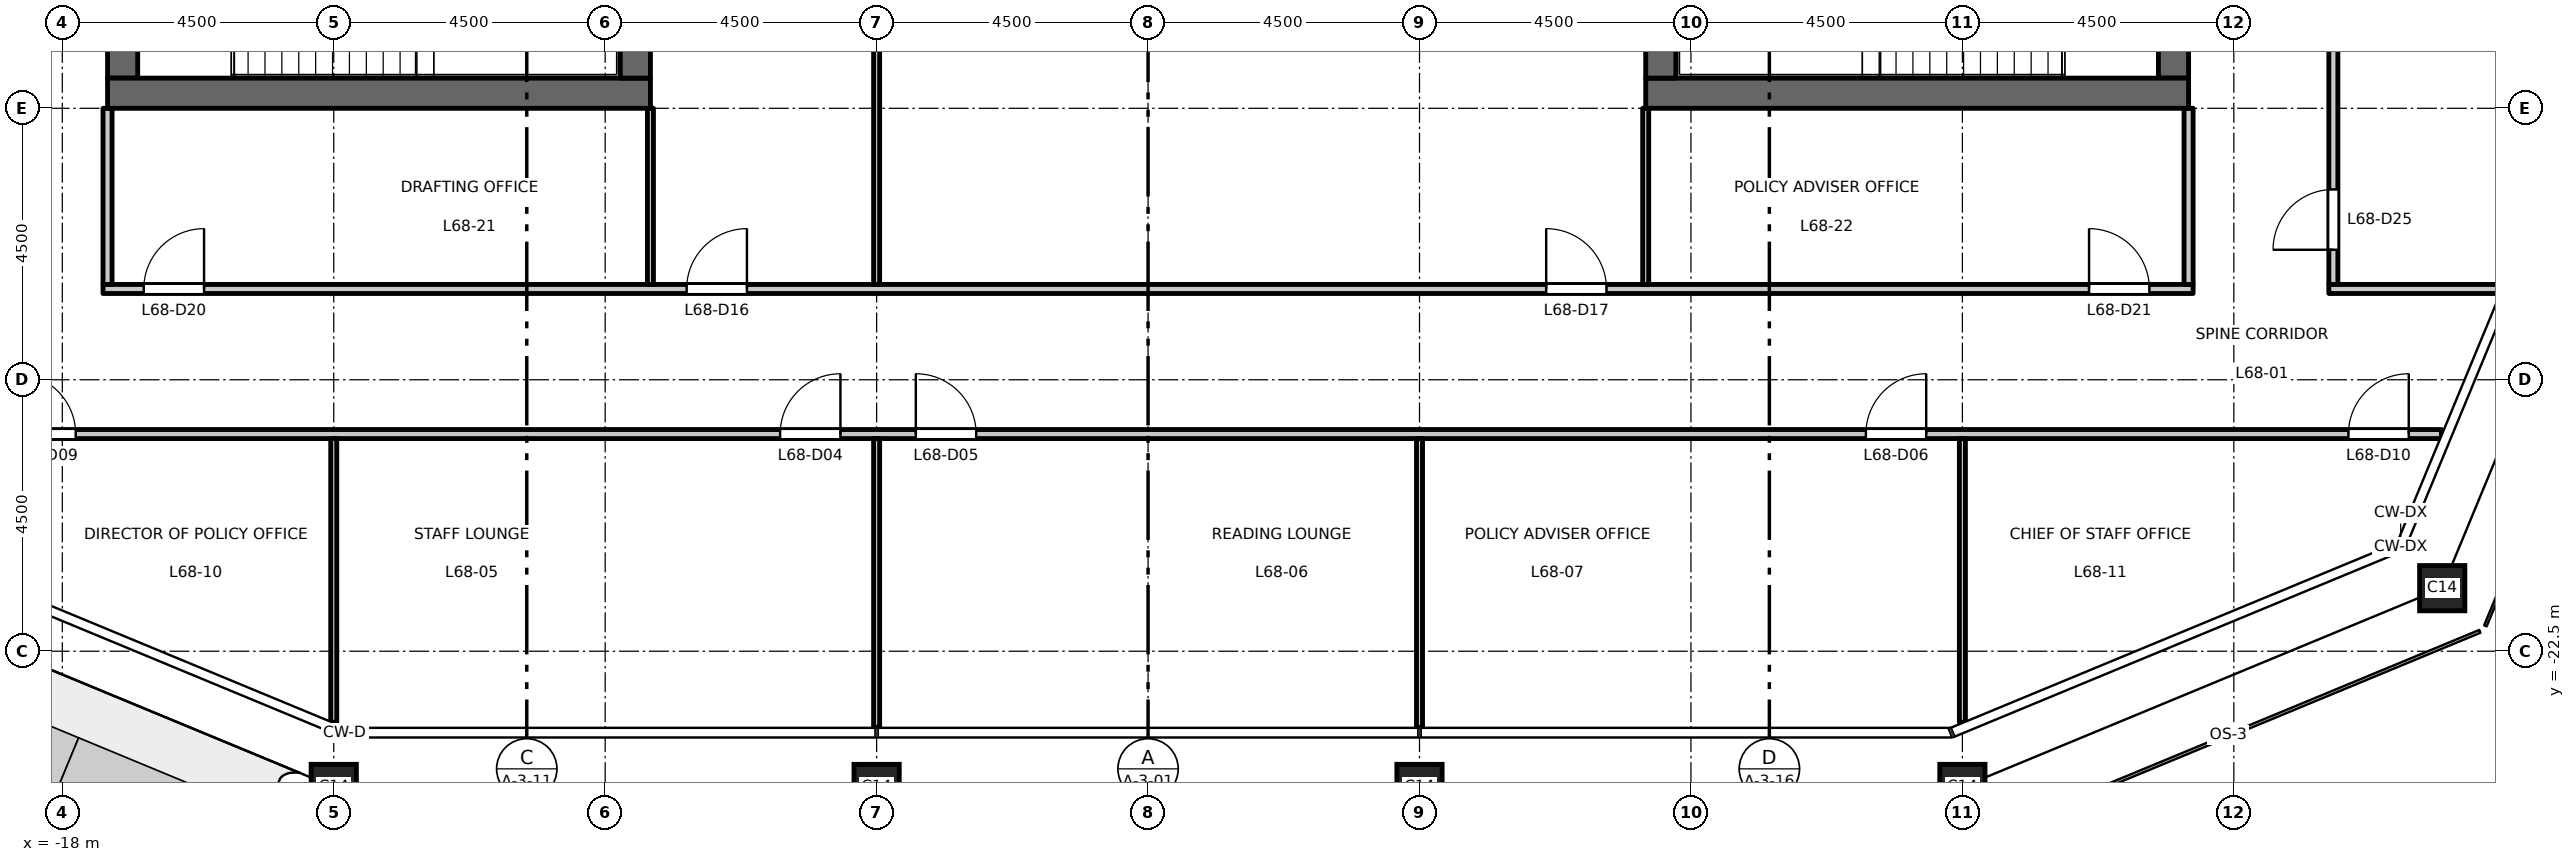
"""IFC4 building model, lengths in metres.
Left out: names, types, materials, properties, quantities, classifications, styles, units other than length and angle.
Written with IfcOpenShell. Run it as: python <this file> out.ifc"""

import sys

from ifc_helpers import new_model, si_unit, direction, frame, frame_2d, origin, origin_2d, place, context, subcontext, project, spatial, rectangle, hollow_rectangle, extrude, element, fill, save


model = new_model("IFC4")
c1 = context("Model", 3, precision=1e-05, world=origin(), true_north=direction((0.0, 1.0)))
c2 = subcontext(c1, "Body", "Model", "MODEL_VIEW")
j1 = project(units=[si_unit("LENGTHUNIT", "METRE"), si_unit("PLANEANGLEUNIT", "RADIAN")], contexts=[c1])
p1 = place(None, origin())
s1 = spatial("IfcSite", under=j1, at=p1, CompositionType="ELEMENT")
p2 = place(p1, origin())
s2 = spatial("IfcBuilding", under=s1, at=p2, CompositionType="ELEMENT")
p3 = place(p2, frame((0.0, 0.0, 316.7)))
s3 = spatial("IfcBuildingStorey", under=s2, at=p3, CompositionType="ELEMENT", Elevation=316.7)
for number, where, z_axis, x_axis in (
    (1, (-13.5, -24.75, 0.0), (0.0, 0.0, 1.0), (1.0, 0.0, 0.0)),
    (2, (-4.5, -24.75, 0.0), (0.0, 0.0, 1.0), (1.0, 0.0, 0.0)),
    (3, (4.5, -24.75, 0.0), (0.0, 0.0, 1.0), (1.0, 0.0, 0.0)),
    (4, (13.5, -24.75, 0.0), (0.0, 0.0, 1.0), (1.0, 0.0, 0.0)),
    (5, (21.455, -21.455, 0.0), (0.0, 0.0, 1.0), (1.0, 0.0, 0.0)),
):
    element("IfcColumn", number, at=place(p3, frame(where, z_axis=z_axis, x_axis=x_axis)), inside=s3, PredefinedType="COLUMN", context=c2, shape_type="SweptSolid", body=[
        extrude(hollow_rectangle(XDim=0.75, YDim=0.75, WallThickness=0.04, at=origin_2d()), origin(), (0.0, 0.0, 1.0), 4.5),
    ])
p4 = place(p3, frame((-17.0, -13.0, 0.0), z_axis=(0.0, 0.0, 1.0), x_axis=(0.0, 1.0, 0.0)))
e6 = element("IfcWall", 6, at=p4, inside=s3, PredefinedType="SHEAR", context=c2, shape_type="SweptSolid", body=[
    extrude(rectangle(XDim=26.0, YDim=0.5, at=frame_2d((13.0, 0.0))), origin(), (0.0, 0.0, 1.0), 4.35),
])
p5 = place(p4, frame((16.825, 0.0, 0.0)))
e7 = element("IfcOpeningElement", 7, at=p5, cuts=e6, PredefinedType="OPENING", context=c2, shape_type="SweptSolid", body=[
    extrude(rectangle(XDim=1.8, YDim=2.1, at=frame_2d((0.9, 1.05))), frame((0.0, 0.26, 0.0), z_axis=(0.0, -1.0, 0.0), x_axis=(1.0, 0.0, 0.0)), (0.0, 0.0, 1.0), 0.52),
])
p6 = place(p4, frame((7.375, 0.0, 0.0)))
e8 = element("IfcOpeningElement", 8, at=p6, cuts=e6, PredefinedType="OPENING", context=c2, shape_type="SweptSolid", body=[
    extrude(rectangle(XDim=1.8, YDim=2.1, at=frame_2d((0.9, 1.05))), frame((0.0, 0.26, 0.0), z_axis=(0.0, -1.0, 0.0), x_axis=(1.0, 0.0, 0.0)), (0.0, 0.0, 1.0), 0.52),
])
p7 = place(p3, frame((-8.25, -13.25, 0.0), z_axis=(0.0, 0.0, 1.0), x_axis=(-1.0, 0.0, 0.0)))
e9 = element("IfcWall", 9, at=p7, inside=s3, PredefinedType="SHEAR", context=c2, shape_type="SweptSolid", body=[
    extrude(rectangle(XDim=9.0, YDim=0.5, at=frame_2d((4.5, 0.0))), origin(), (0.0, 0.0, 1.0), 4.35),
])
p8 = place(p3, frame((-8.5, -13.0, 0.0), z_axis=(0.0, 0.0, 1.0), x_axis=(0.0, 1.0, 0.0)))
e10 = element("IfcWall", 10, at=p8, inside=s3, PredefinedType="SHEAR", context=c2, shape_type="SweptSolid", body=[
    extrude(rectangle(XDim=26.0, YDim=0.5, at=frame_2d((13.0, 0.0))), origin(), (0.0, 0.0, 1.0), 4.35),
])
p9 = place(p3, frame((17.0, -13.0, 0.0), z_axis=(0.0, 0.0, 1.0), x_axis=(0.0, 1.0, 0.0)))
e11 = element("IfcWall", 11, at=p9, inside=s3, PredefinedType="SHEAR", context=c2, shape_type="SweptSolid", body=[
    extrude(rectangle(XDim=26.0, YDim=0.5, at=frame_2d((13.0, 0.0))), origin(), (0.0, 0.0, 1.0), 4.35),
])
p10 = place(p9, frame((16.825, 0.0, 0.0)))
e12 = element("IfcOpeningElement", 12, at=p10, cuts=e11, PredefinedType="OPENING", context=c2, shape_type="SweptSolid", body=[
    extrude(rectangle(XDim=1.8, YDim=2.1, at=frame_2d((0.9, 1.05))), frame((0.0, 0.26, 0.0), z_axis=(0.0, -1.0, 0.0), x_axis=(1.0, 0.0, 0.0)), (0.0, 0.0, 1.0), 0.52),
])
p11 = place(p9, frame((7.375, 0.0, 0.0)))
e13 = element("IfcOpeningElement", 13, at=p11, cuts=e11, PredefinedType="OPENING", context=c2, shape_type="SweptSolid", body=[
    extrude(rectangle(XDim=1.8, YDim=2.1, at=frame_2d((0.9, 1.05))), frame((0.0, 0.26, 0.0), z_axis=(0.0, -1.0, 0.0), x_axis=(1.0, 0.0, 0.0)), (0.0, 0.0, 1.0), 0.52),
])
p12 = place(p3, frame((8.25, -13.25, 0.0), z_axis=(0.0, 0.0, 1.0), x_axis=(1.0, 0.0, 0.0)))
e14 = element("IfcWall", 14, at=p12, inside=s3, PredefinedType="SHEAR", context=c2, shape_type="SweptSolid", body=[
    extrude(rectangle(XDim=9.0, YDim=0.5, at=frame_2d((4.5, 0.0))), origin(), (0.0, 0.0, 1.0), 4.35),
])
p13 = place(p3, frame((8.5, -13.0, 0.0), z_axis=(0.0, 0.0, 1.0), x_axis=(0.0, 1.0, 0.0)))
e15 = element("IfcWall", 15, at=p13, inside=s3, PredefinedType="SHEAR", context=c2, shape_type="SweptSolid", body=[
    extrude(rectangle(XDim=26.0, YDim=0.5, at=frame_2d((13.0, 0.0))), origin(), (0.0, 0.0, 1.0), 4.35),
])
p14 = place(p3, frame((-19.503, -18.9, 0.0), z_axis=(0.0, 0.0, 1.0), x_axis=(1.0, 0.0, 0.0)))
e16 = element("IfcWall", 16, at=p14, inside=s3, PredefinedType="PARTITIONING", context=c2, shape_type="SweptSolid", body=[
    extrude(rectangle(XDim=40.944, YDim=0.15, at=frame_2d((20.472, 0.0))), origin(), (0.0, 0.0, 1.0), 4.35),
])
p15 = place(p14, frame((13.403, 0.0, 0.0)))
e17 = element("IfcOpeningElement", 17, at=p15, cuts=e16, PredefinedType="OPENING", context=c2, shape_type="SweptSolid", body=[
    extrude(rectangle(XDim=1.0, YDim=2.1, at=frame_2d((0.5, 1.05))), frame((0.0, 0.085, 0.0), z_axis=(0.0, -1.0, 0.0), x_axis=(1.0, 0.0, 0.0)), (0.0, 0.0, 1.0), 0.17),
])
p16 = place(p14, frame((15.653, 0.0, 0.0)))
e18 = element("IfcOpeningElement", 18, at=p16, cuts=e16, PredefinedType="OPENING", context=c2, shape_type="SweptSolid", body=[
    extrude(rectangle(XDim=1.0, YDim=2.1, at=frame_2d((0.5, 1.05))), frame((0.0, 0.085, 0.0), z_axis=(0.0, -1.0, 0.0), x_axis=(1.0, 0.0, 0.0)), (0.0, 0.0, 1.0), 0.17),
])
p17 = place(p14, frame((31.403, 0.0, 0.0)))
e19 = element("IfcOpeningElement", 19, at=p17, cuts=e16, PredefinedType="OPENING", context=c2, shape_type="SweptSolid", body=[
    extrude(rectangle(XDim=1.0, YDim=2.1, at=frame_2d((0.5, 1.05))), frame((0.0, 0.085, 0.0), z_axis=(0.0, -1.0, 0.0), x_axis=(1.0, 0.0, 0.0)), (0.0, 0.0, 1.0), 0.17),
])
p18 = place(p14, frame((0.725, 0.0, 0.0)))
e20 = element("IfcOpeningElement", 20, at=p18, cuts=e16, PredefinedType="OPENING", context=c2, shape_type="SweptSolid", body=[
    extrude(rectangle(XDim=1.0, YDim=2.1, at=frame_2d((0.5, 1.05))), frame((0.0, 0.085, 0.0), z_axis=(0.0, -1.0, 0.0), x_axis=(1.0, 0.0, 0.0)), (0.0, 0.0, 1.0), 0.17),
])
p19 = place(p14, frame((39.403, 0.0, 0.0)))
e21 = element("IfcOpeningElement", 21, at=p19, cuts=e16, PredefinedType="OPENING", context=c2, shape_type="SweptSolid", body=[
    extrude(rectangle(XDim=1.0, YDim=2.1, at=frame_2d((0.5, 1.05))), frame((0.0, 0.085, 0.0), z_axis=(0.0, -1.0, 0.0), x_axis=(1.0, 0.0, 0.0)), (0.0, 0.0, 1.0), 0.17),
])
p20 = place(p3, frame((-17.325, -16.495, 0.0), z_axis=(0.0, 0.0, 1.0), x_axis=(1.0, 0.0, 0.0)))
e22 = element("IfcWall", 22, at=p20, inside=s3, PredefinedType="PARTITIONING", context=c2, shape_type="SweptSolid", body=[
    extrude(rectangle(XDim=34.65, YDim=0.15, at=frame_2d((17.325, 0.0))), origin(), (0.0, 0.0, 1.0), 4.35),
])
p21 = place(p20, frame((9.675, 0.0, 0.0)))
e23 = element("IfcOpeningElement", 23, at=p21, cuts=e22, PredefinedType="OPENING", context=c2, shape_type="SweptSolid", body=[
    extrude(rectangle(XDim=1.0, YDim=2.1, at=frame_2d((0.5, 1.05))), frame((0.0, 0.085, 0.0), z_axis=(0.0, -1.0, 0.0), x_axis=(1.0, 0.0, 0.0)), (0.0, 0.0, 1.0), 0.17),
])
p22 = place(p20, frame((23.925, 0.0, 0.0)))
e24 = element("IfcOpeningElement", 24, at=p22, cuts=e22, PredefinedType="OPENING", context=c2, shape_type="SweptSolid", body=[
    extrude(rectangle(XDim=1.0, YDim=2.1, at=frame_2d((0.5, 1.05))), frame((0.0, 0.085, 0.0), z_axis=(0.0, -1.0, 0.0), x_axis=(1.0, 0.0, 0.0)), (0.0, 0.0, 1.0), 0.17),
])
p23 = place(p20, frame((0.675, 0.0, 0.0)))
e25 = element("IfcOpeningElement", 25, at=p23, cuts=e22, PredefinedType="OPENING", context=c2, shape_type="SweptSolid", body=[
    extrude(rectangle(XDim=1.0, YDim=2.1, at=frame_2d((0.5, 1.05))), frame((0.0, 0.085, 0.0), z_axis=(0.0, -1.0, 0.0), x_axis=(1.0, 0.0, 0.0)), (0.0, 0.0, 1.0), 0.17),
])
p24 = place(p20, frame((32.925, 0.0, 0.0)))
e26 = element("IfcOpeningElement", 26, at=p24, cuts=e22, PredefinedType="OPENING", context=c2, shape_type="SweptSolid", body=[
    extrude(rectangle(XDim=1.0, YDim=2.1, at=frame_2d((0.5, 1.05))), frame((0.0, 0.085, 0.0), z_axis=(0.0, -1.0, 0.0), x_axis=(1.0, 0.0, 0.0)), (0.0, 0.0, 1.0), 0.17),
])
p25 = place(p3, frame((19.575, -16.495, 0.0), z_axis=(0.0, 0.0, 1.0), x_axis=(1.0, 0.0, 0.0)))
e27 = element("IfcWall", 27, at=p25, inside=s3, PredefinedType="PARTITIONING", context=c2, shape_type="SweptSolid", body=[
    extrude(rectangle(XDim=2.861, YDim=0.15, at=frame_2d((1.431, 0.0))), origin(), (0.0, 0.0, 1.0), 4.35),
])
p26 = place(p3, frame((-17.25, -16.42, 0.0), z_axis=(0.0, 0.0, 1.0), x_axis=(0.0, 1.0, 0.0)))
e28 = element("IfcWall", 28, at=p26, inside=s3, PredefinedType="PARTITIONING", context=c2, shape_type="SweptSolid", body=[
    extrude(rectangle(XDim=2.92, YDim=0.15, at=frame_2d((1.46, 0.0))), origin(), (0.0, 0.0, 1.0), 4.35),
])
p27 = place(p3, frame((-13.5, -23.678, 0.0), z_axis=(0.0, 0.0, 1.0), x_axis=(0.0, 1.0, 0.0)))
e29 = element("IfcWall", 29, at=p27, inside=s3, PredefinedType="PARTITIONING", context=c2, shape_type="SweptSolid", body=[
    extrude(rectangle(XDim=4.703, YDim=0.1, at=frame_2d((2.352, 0.0))), origin(), (0.0, 0.0, 1.0), 3.75),
])
p28 = place(p3, frame((-8.25, -16.42, 0.0), z_axis=(0.0, 0.0, 1.0), x_axis=(0.0, 1.0, 0.0)))
e30 = element("IfcWall", 30, at=p28, inside=s3, PredefinedType="PARTITIONING", context=c2, shape_type="SweptSolid", body=[
    extrude(rectangle(XDim=2.92, YDim=0.1, at=frame_2d((1.46, 0.0))), origin(), (0.0, 0.0, 1.0), 4.35),
])
p29 = place(p3, frame((-4.5, -23.76, 0.0), z_axis=(0.0, 0.0, 1.0), x_axis=(0.0, 1.0, 0.0)))
e31 = element("IfcWall", 31, at=p29, inside=s3, PredefinedType="PARTITIONING", context=c2, shape_type="SweptSolid", body=[
    extrude(rectangle(XDim=4.785, YDim=0.1, at=frame_2d((2.393, 0.0))), origin(), (0.0, 0.0, 1.0), 3.65),
])
p30 = place(p3, frame((-4.5, -16.42, 0.0), z_axis=(0.0, 0.0, 1.0), x_axis=(0.0, 1.0, 0.0)))
e32 = element("IfcWall", 32, at=p30, inside=s3, PredefinedType="PARTITIONING", context=c2, shape_type="SweptSolid", body=[
    extrude(rectangle(XDim=8.05, YDim=0.1, at=frame_2d((4.025, 0.0))), origin(), (0.0, 0.0, 1.0), 3.65),
])
p31 = place(p3, frame((4.5, -23.76, 0.0), z_axis=(0.0, 0.0, 1.0), x_axis=(0.0, 1.0, 0.0)))
e33 = element("IfcWall", 33, at=p31, inside=s3, PredefinedType="PARTITIONING", context=c2, shape_type="SweptSolid", body=[
    extrude(rectangle(XDim=4.785, YDim=0.1, at=frame_2d((2.393, 0.0))), origin(), (0.0, 0.0, 1.0), 3.65),
])
p32 = place(p3, frame((8.25, -16.42, 0.0), z_axis=(0.0, 0.0, 1.0), x_axis=(0.0, 1.0, 0.0)))
e34 = element("IfcWall", 34, at=p32, inside=s3, PredefinedType="PARTITIONING", context=c2, shape_type="SweptSolid", body=[
    extrude(rectangle(XDim=2.92, YDim=0.1, at=frame_2d((1.46, 0.0))), origin(), (0.0, 0.0, 1.0), 4.35),
])
p33 = place(p3, frame((13.5, -23.678, 0.0), z_axis=(0.0, 0.0, 1.0), x_axis=(0.0, 1.0, 0.0)))
e35 = element("IfcWall", 35, at=p33, inside=s3, PredefinedType="PARTITIONING", context=c2, shape_type="SweptSolid", body=[
    extrude(rectangle(XDim=4.703, YDim=0.1, at=frame_2d((2.352, 0.0))), origin(), (0.0, 0.0, 1.0), 3.75),
])
p34 = place(p3, frame((17.25, -16.42, 0.0), z_axis=(0.0, 0.0, 1.0), x_axis=(0.0, 1.0, 0.0)))
e36 = element("IfcWall", 36, at=p34, inside=s3, PredefinedType="PARTITIONING", context=c2, shape_type="SweptSolid", body=[
    extrude(rectangle(XDim=2.92, YDim=0.15, at=frame_2d((1.46, 0.0))), origin(), (0.0, 0.0, 1.0), 4.35),
])
p35 = place(p3, frame((19.65, -16.42, 0.0), z_axis=(0.0, 0.0, 1.0), x_axis=(0.0, 1.0, 0.0)))
e37 = element("IfcWall", 37, at=p35, inside=s3, PredefinedType="PARTITIONING", context=c2, shape_type="SweptSolid", body=[
    extrude(rectangle(XDim=32.845, YDim=0.15, at=frame_2d((16.422, 0.0))), origin(), (0.0, 0.0, 1.0), 4.35),
])
p36 = place(p35, frame((0.575, 0.0, 0.0)))
e38 = element("IfcOpeningElement", 38, at=p36, cuts=e37, PredefinedType="OPENING", context=c2, shape_type="SweptSolid", body=[
    extrude(rectangle(XDim=1.0, YDim=2.1, at=frame_2d((0.5, 1.05))), frame((0.0, 0.085, 0.0), z_axis=(0.0, -1.0, 0.0), x_axis=(1.0, 0.0, 0.0)), (0.0, 0.0, 1.0), 0.17),
])
p37 = place(p15, origin())
e39 = element("IfcDoor", 39, at=p37, inside=s3, OperationType="SINGLE_SWING_RIGHT", PredefinedType="DOOR", context=c2, shape_type="SweptSolid", body=[
    extrude(rectangle(XDim=1.0, YDim=2.1, at=frame_2d((0.5, 1.05))), frame((0.0, 0.025, 0.0), z_axis=(0.0, -1.0, 0.0), x_axis=(1.0, 0.0, 0.0)), (0.0, 0.0, 1.0), 0.05),
])
fill(e17, e39)
p38 = place(p16, origin())
e40 = element("IfcDoor", 40, at=p38, inside=s3, OperationType="SINGLE_SWING_LEFT", PredefinedType="DOOR", context=c2, shape_type="SweptSolid", body=[
    extrude(rectangle(XDim=1.0, YDim=2.1, at=frame_2d((0.5, 1.05))), frame((0.0, 0.025, 0.0), z_axis=(0.0, -1.0, 0.0), x_axis=(1.0, 0.0, 0.0)), (0.0, 0.0, 1.0), 0.05),
])
fill(e18, e40)
p39 = place(p17, origin())
e41 = element("IfcDoor", 41, at=p39, inside=s3, OperationType="SINGLE_SWING_RIGHT", PredefinedType="DOOR", context=c2, shape_type="SweptSolid", body=[
    extrude(rectangle(XDim=1.0, YDim=2.1, at=frame_2d((0.5, 1.05))), frame((0.0, 0.025, 0.0), z_axis=(0.0, -1.0, 0.0), x_axis=(1.0, 0.0, 0.0)), (0.0, 0.0, 1.0), 0.05),
])
fill(e19, e41)
p40 = place(p18, origin())
e42 = element("IfcDoor", 42, at=p40, inside=s3, OperationType="SINGLE_SWING_LEFT", PredefinedType="DOOR", context=c2, shape_type="SweptSolid", body=[
    extrude(rectangle(XDim=1.0, YDim=2.1, at=frame_2d((0.5, 1.05))), frame((0.0, 0.025, 0.0), z_axis=(0.0, -1.0, 0.0), x_axis=(1.0, 0.0, 0.0)), (0.0, 0.0, 1.0), 0.05),
])
fill(e20, e42)
p41 = place(p19, origin())
e43 = element("IfcDoor", 43, at=p41, inside=s3, OperationType="SINGLE_SWING_RIGHT", PredefinedType="DOOR", context=c2, shape_type="SweptSolid", body=[
    extrude(rectangle(XDim=1.0, YDim=2.1, at=frame_2d((0.5, 1.05))), frame((0.0, 0.025, 0.0), z_axis=(0.0, -1.0, 0.0), x_axis=(1.0, 0.0, 0.0)), (0.0, 0.0, 1.0), 0.05),
])
fill(e21, e43)
p42 = place(p21, origin())
e44 = element("IfcDoor", 44, at=p42, inside=s3, OperationType="SINGLE_SWING_RIGHT", PredefinedType="DOOR", context=c2, shape_type="SweptSolid", body=[
    extrude(rectangle(XDim=1.0, YDim=2.1, at=frame_2d((0.5, 1.05))), frame((0.0, 0.025, 0.0), z_axis=(0.0, -1.0, 0.0), x_axis=(1.0, 0.0, 0.0)), (0.0, 0.0, 1.0), 0.05),
])
fill(e23, e44)
p43 = place(p22, origin())
e45 = element("IfcDoor", 45, at=p43, inside=s3, OperationType="SINGLE_SWING_LEFT", PredefinedType="DOOR", context=c2, shape_type="SweptSolid", body=[
    extrude(rectangle(XDim=1.0, YDim=2.1, at=frame_2d((0.5, 1.05))), frame((0.0, 0.025, 0.0), z_axis=(0.0, -1.0, 0.0), x_axis=(1.0, 0.0, 0.0)), (0.0, 0.0, 1.0), 0.05),
])
fill(e24, e45)
p44 = place(p23, origin())
e46 = element("IfcDoor", 46, at=p44, inside=s3, OperationType="SINGLE_SWING_RIGHT", PredefinedType="DOOR", context=c2, shape_type="SweptSolid", body=[
    extrude(rectangle(XDim=1.0, YDim=2.1, at=frame_2d((0.5, 1.05))), frame((0.0, 0.025, 0.0), z_axis=(0.0, -1.0, 0.0), x_axis=(1.0, 0.0, 0.0)), (0.0, 0.0, 1.0), 0.05),
])
fill(e25, e46)
p45 = place(p24, origin())
e47 = element("IfcDoor", 47, at=p45, inside=s3, OperationType="SINGLE_SWING_LEFT", PredefinedType="DOOR", context=c2, shape_type="SweptSolid", body=[
    extrude(rectangle(XDim=1.0, YDim=2.1, at=frame_2d((0.5, 1.05))), frame((0.0, 0.025, 0.0), z_axis=(0.0, -1.0, 0.0), x_axis=(1.0, 0.0, 0.0)), (0.0, 0.0, 1.0), 0.05),
])
fill(e26, e47)
p46 = place(p36, origin())
e48 = element("IfcDoor", 48, at=p46, inside=s3, OperationType="SINGLE_SWING_LEFT", PredefinedType="DOOR", context=c2, shape_type="SweptSolid", body=[
    extrude(rectangle(XDim=1.0, YDim=2.1, at=frame_2d((0.5, 1.05))), frame((0.0, 0.025, 0.0), z_axis=(0.0, -1.0, 0.0), x_axis=(1.0, 0.0, 0.0)), (0.0, 0.0, 1.0), 0.05),
])
fill(e38, e48)
save(model, sys.argv[1])
